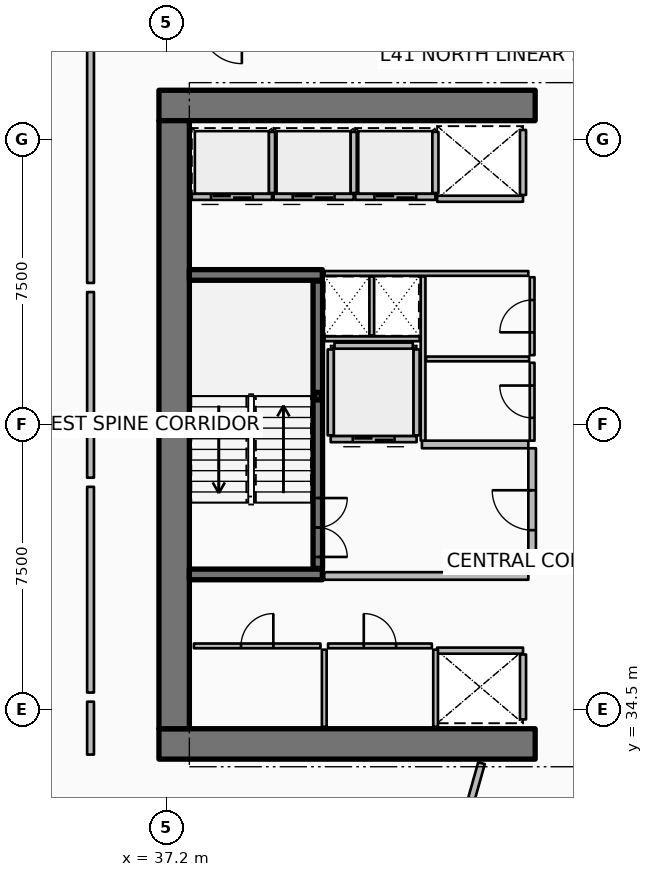
"""IFC4 building model, lengths in metres.
Left out: names, types, materials, properties, quantities, classifications, styles, units other than length and angle.
Written with IfcOpenShell. Run it as: python <this file> out.ifc"""

import sys

from ifc_helpers import new_model, si_unit, direction, frame, frame_2d, origin, origin_2d, place, context, subcontext, project, spatial, rectangle, hollow_rectangle, extrude, element, fill, save


model = new_model("IFC4")
c1 = context("Model", 3, precision=1e-05, world=origin(), true_north=direction((0.0, 1.0)))
c2 = subcontext(c1, "Body", "Model", "MODEL_VIEW")
j1 = project(units=[si_unit("LENGTHUNIT", "METRE"), si_unit("PLANEANGLEUNIT", "RADIAN")], contexts=[c1])
p1 = place(None, origin())
s1 = spatial("IfcSite", under=j1, at=p1, CompositionType="ELEMENT")
p2 = place(p1, origin())
s2 = spatial("IfcBuilding", under=s1, at=p2, CompositionType="ELEMENT")
p3 = place(p2, frame((0.0, 0.0, 165.3)))
s3 = spatial("IfcBuildingStorey", under=s2, at=p3, CompositionType="ELEMENT", Elevation=165.3)
for number, where, z_axis, x_axis in (
    (1, (37.0, 33.6, 0.0), (0.0, 0.0, 1.0), (1.0, 0.0, 0.0)),
    (2, (37.0, 50.4, 0.0), (0.0, 0.0, 1.0), (1.0, 0.0, 0.0)),
):
    element("IfcWall", number, at=place(p3, frame(where, z_axis=z_axis, x_axis=x_axis)), inside=s3, PredefinedType="SHEAR", context=c2, shape_type="SweptSolid", body=[
        extrude(rectangle(XDim=9.9, YDim=0.8, at=frame_2d((4.95, 0.0))), origin(), (0.0, 0.0, 1.0), 3.75),
    ])
p4 = place(p3, frame((37.4, 34.0, 0.0), z_axis=(0.0, 0.0, 1.0), x_axis=(0.0, 1.0, 0.0)))
e3 = element("IfcWall", 3, at=p4, inside=s3, PredefinedType="SHEAR", context=c2, shape_type="SweptSolid", body=[
    extrude(rectangle(XDim=16.0, YDim=0.8, at=frame_2d((8.0, 0.0))), origin(), (0.0, 0.0, 1.0), 3.75),
])
for number, where, z_axis, x_axis in (
    (4, (37.8, 38.06, 0.0), (0.0, 0.0, 1.0), (1.0, 0.0, 0.0)),
    (5, (37.8, 45.94, 0.0), (0.0, 0.0, 1.0), (1.0, 0.0, 0.0)),
):
    element("IfcWall", number, at=place(p3, frame(where, z_axis=z_axis, x_axis=x_axis)), inside=s3, PredefinedType="SHEAR", context=c2, shape_type="SweptSolid", body=[
        extrude(rectangle(XDim=3.5, YDim=0.28, at=frame_2d((1.75, 0.0))), origin(), (0.0, 0.0, 1.0), 3.75),
    ])
p5 = place(p3, frame((41.18, 42.75, 0.0), z_axis=(0.0, 0.0, 1.0), x_axis=(1.0, 0.0, 0.0)))
e6 = element("IfcColumn", 6, at=p5, inside=s3, PredefinedType="COLUMN", context=c2, shape_type="SweptSolid", body=[
    extrude(hollow_rectangle(XDim=0.2, YDim=0.2, WallThickness=0.01, InnerFilletRadius=0.01, OuterFilletRadius=0.02, at=origin_2d()), origin(), (0.0, 0.0, 1.0), 1.67),
])
p6 = place(p3, frame((41.18, 38.22, 0.0), z_axis=(0.0, 0.0, 1.0), x_axis=(0.0, 1.0, 0.0)))
e7 = element("IfcWall", 7, at=p6, inside=s3, PredefinedType="SOLIDWALL", context=c2, shape_type="SweptSolid", body=[
    extrude(rectangle(XDim=7.56, YDim=0.25, at=frame_2d((3.78, 0.0))), origin(), (0.0, 0.0, 1.0), 3.5),
])
p7 = place(p6, frame((0.3, 0.0, 0.0)))
e8 = element("IfcOpeningElement", 8, at=p7, cuts=e7, PredefinedType="OPENING", context=c2, shape_type="SweptSolid", body=[
    extrude(rectangle(XDim=1.55, YDim=2.15, at=frame_2d((0.775, 1.075))), frame((0.0, 0.135, 0.0), z_axis=(0.0, -1.0, 0.0), x_axis=(1.0, 0.0, 0.0)), (0.0, 0.0, 1.0), 0.27),
])
p8 = place(p3, frame((39.975, 47.995, 0.0), z_axis=(0.0, 0.0, 1.0), x_axis=(-1.0, 0.0, 0.0)))
e9 = element("IfcWall", 9, at=p8, inside=s3, PredefinedType="PARTITIONING", context=c2, shape_type="SweptSolid", body=[
    extrude(rectangle(XDim=2.11, YDim=0.16, at=frame_2d((1.055, 0.0))), origin(), (0.0, 0.0, 1.0), 3.5),
])
p9 = place(p8, frame((0.505, 0.0, 0.0)))
e10 = element("IfcOpeningElement", 10, at=p9, cuts=e9, PredefinedType="OPENING", context=c2, shape_type="SweptSolid", body=[
    extrude(rectangle(XDim=1.1, YDim=2.1, at=frame_2d((0.55, 1.05))), frame((0.0, 0.09, 0.0), z_axis=(0.0, -1.0, 0.0), x_axis=(1.0, 0.0, 0.0)), (0.0, 0.0, 1.0), 0.18),
])
p10 = place(p3, frame((39.975, 48.095, 0.0), z_axis=(0.0, 0.0, 1.0), x_axis=(0.0, 1.0, 0.0)))
e11 = element("IfcWall", 11, at=p10, inside=s3, PredefinedType="PARTITIONING", context=c2, shape_type="SweptSolid", body=[
    extrude(rectangle(XDim=1.61, YDim=0.16, at=frame_2d((0.805, 0.0))), origin(), (0.0, 0.0, 1.0), 3.5),
])
p11 = place(p3, frame((42.125, 47.995, 0.0), z_axis=(0.0, 0.0, 1.0), x_axis=(-1.0, 0.0, 0.0)))
e12 = element("IfcWall", 12, at=p11, inside=s3, PredefinedType="PARTITIONING", context=c2, shape_type="SweptSolid", body=[
    extrude(rectangle(XDim=2.11, YDim=0.16, at=frame_2d((1.055, 0.0))), origin(), (0.0, 0.0, 1.0), 3.5),
])
p12 = place(p11, frame((0.505, 0.0, 0.0)))
e13 = element("IfcOpeningElement", 13, at=p12, cuts=e12, PredefinedType="OPENING", context=c2, shape_type="SweptSolid", body=[
    extrude(rectangle(XDim=1.1, YDim=2.1, at=frame_2d((0.55, 1.05))), frame((0.0, 0.09, 0.0), z_axis=(0.0, -1.0, 0.0), x_axis=(1.0, 0.0, 0.0)), (0.0, 0.0, 1.0), 0.18),
])
p13 = place(p3, frame((42.125, 48.095, 0.0), z_axis=(0.0, 0.0, 1.0), x_axis=(0.0, 1.0, 0.0)))
e14 = element("IfcWall", 14, at=p13, inside=s3, PredefinedType="PARTITIONING", context=c2, shape_type="SweptSolid", body=[
    extrude(rectangle(XDim=1.61, YDim=0.16, at=frame_2d((0.805, 0.0))), origin(), (0.0, 0.0, 1.0), 3.5),
])
p14 = place(p3, frame((44.275, 47.995, 0.0), z_axis=(0.0, 0.0, 1.0), x_axis=(-1.0, 0.0, 0.0)))
e15 = element("IfcWall", 15, at=p14, inside=s3, PredefinedType="PARTITIONING", context=c2, shape_type="SweptSolid", body=[
    extrude(rectangle(XDim=2.11, YDim=0.16, at=frame_2d((1.055, 0.0))), origin(), (0.0, 0.0, 1.0), 3.5),
])
p15 = place(p14, frame((0.505, 0.0, 0.0)))
e16 = element("IfcOpeningElement", 16, at=p15, cuts=e15, PredefinedType="OPENING", context=c2, shape_type="SweptSolid", body=[
    extrude(rectangle(XDim=1.1, YDim=2.1, at=frame_2d((0.55, 1.05))), frame((0.0, 0.09, 0.0), z_axis=(0.0, -1.0, 0.0), x_axis=(1.0, 0.0, 0.0)), (0.0, 0.0, 1.0), 0.18),
])
p16 = place(p3, frame((44.275, 48.095, 0.0), z_axis=(0.0, 0.0, 1.0), x_axis=(0.0, 1.0, 0.0)))
e17 = element("IfcWall", 17, at=p16, inside=s3, PredefinedType="PARTITIONING", context=c2, shape_type="SweptSolid", body=[
    extrude(rectangle(XDim=1.61, YDim=0.16, at=frame_2d((0.805, 0.0))), origin(), (0.0, 0.0, 1.0), 3.5),
])
p17 = place(p3, frame((46.58, 47.945, 0.0), z_axis=(0.0, 0.0, 1.0), x_axis=(-1.0, 0.0, 0.0)))
e18 = element("IfcWall", 18, at=p17, inside=s3, PredefinedType="PARTITIONING", context=c2, shape_type="SweptSolid", body=[
    extrude(rectangle(XDim=2.26, YDim=0.16, at=frame_2d((1.13, 0.0))), origin(), (0.0, 0.0, 1.0), 3.5),
])
p18 = place(p3, frame((46.58, 48.045, 0.0), z_axis=(0.0, 0.0, 1.0), x_axis=(0.0, 1.0, 0.0)))
e19 = element("IfcWall", 19, at=p18, inside=s3, PredefinedType="PARTITIONING", context=c2, shape_type="SweptSolid", body=[
    extrude(rectangle(XDim=1.71, YDim=0.16, at=frame_2d((0.855, 0.0))), origin(), (0.0, 0.0, 1.0), 3.5),
])
p19 = place(p3, frame((44.32, 36.055, 0.0), z_axis=(0.0, 0.0, 1.0), x_axis=(1.0, 0.0, 0.0)))
e20 = element("IfcWall", 20, at=p19, inside=s3, PredefinedType="PARTITIONING", context=c2, shape_type="SweptSolid", body=[
    extrude(rectangle(XDim=2.26, YDim=0.16, at=frame_2d((1.13, 0.0))), origin(), (0.0, 0.0, 1.0), 3.5),
])
p20 = place(p3, frame((46.58, 34.245, 0.0), z_axis=(0.0, 0.0, 1.0), x_axis=(0.0, 1.0, 0.0)))
e21 = element("IfcWall", 21, at=p20, inside=s3, PredefinedType="PARTITIONING", context=c2, shape_type="SweptSolid", body=[
    extrude(rectangle(XDim=1.71, YDim=0.16, at=frame_2d((0.855, 0.0))), origin(), (0.0, 0.0, 1.0), 3.5),
])
p21 = place(p3, frame((43.78, 41.62, 0.0), z_axis=(0.0, 0.0, 1.0), x_axis=(-1.0, 0.0, 0.0)))
e22 = element("IfcWall", 22, at=p21, inside=s3, PredefinedType="PARTITIONING", context=c2, shape_type="SweptSolid", body=[
    extrude(rectangle(XDim=2.26, YDim=0.16, at=frame_2d((1.13, 0.0))), origin(), (0.0, 0.0, 1.0), 3.5),
])
p22 = place(p21, frame((0.58, 0.0, 0.0)))
e23 = element("IfcOpeningElement", 23, at=p22, cuts=e22, PredefinedType="OPENING", context=c2, shape_type="SweptSolid", body=[
    extrude(rectangle(XDim=1.1, YDim=2.1, at=frame_2d((0.55, 1.05))), frame((0.0, 0.09, 0.0), z_axis=(0.0, -1.0, 0.0), x_axis=(1.0, 0.0, 0.0)), (0.0, 0.0, 1.0), 0.18),
])
for number, where, z_axis, x_axis in (
    (24, (43.78, 41.72, 0.0), (0.0, 0.0, 1.0), (0.0, 1.0, 0.0)),
    (25, (41.52, 41.72, 0.0), (0.0, 0.0, 1.0), (0.0, 1.0, 0.0)),
):
    element("IfcWall", number, at=place(p3, frame(where, z_axis=z_axis, x_axis=x_axis)), inside=s3, PredefinedType="PARTITIONING", context=c2, shape_type="SweptSolid", body=[
        extrude(rectangle(XDim=2.26, YDim=0.16, at=frame_2d((1.13, 0.0))), origin(), (0.0, 0.0, 1.0), 3.5),
    ])
p23 = place(p3, frame((41.62, 44.08, 0.0), z_axis=(0.0, 0.0, 1.0), x_axis=(1.0, 0.0, 0.0)))
e26 = element("IfcWall", 26, at=p23, inside=s3, PredefinedType="PARTITIONING", context=c2, shape_type="SweptSolid", body=[
    extrude(rectangle(XDim=2.06, YDim=0.16, at=frame_2d((1.03, 0.0))), origin(), (0.0, 0.0, 1.0), 3.5),
])
for number, where, z_axis, x_axis in (
    (27, (44.28, 34.05, 0.0), (0.0, 0.0, 1.0), (0.0, 1.0, 0.0)),
    (28, (41.35, 34.05, 0.0), (0.0, 0.0, 1.0), (0.0, 1.0, 0.0)),
):
    element("IfcWall", number, at=place(p3, frame(where, z_axis=z_axis, x_axis=x_axis)), inside=s3, PredefinedType="PARTITIONING", context=c2, shape_type="SweptSolid", body=[
        extrude(rectangle(XDim=2.03, YDim=0.125, at=frame_2d((1.015, 0.0))), origin(), (0.0, 0.0, 1.0), 2.94),
    ])
p24 = place(p3, frame((37.92, 36.18, 0.0), z_axis=(0.0, 0.0, 1.0), x_axis=(1.0, 0.0, 0.0)))
e29 = element("IfcWall", 29, at=p24, inside=s3, PredefinedType="PARTITIONING", context=c2, shape_type="SweptSolid", body=[
    extrude(rectangle(XDim=3.33, YDim=0.125, at=frame_2d((1.665, 0.0))), origin(), (0.0, 0.0, 1.0), 2.94),
])
p25 = place(p24, frame((1.24, 0.0, 0.0)))
e30 = element("IfcOpeningElement", 30, at=p25, cuts=e29, PredefinedType="OPENING", context=c2, shape_type="SweptSolid", body=[
    extrude(rectangle(XDim=0.85, YDim=2.06, at=frame_2d((0.425, 1.03))), frame((0.0, 0.073, 0.0), z_axis=(0.0, -1.0, 0.0), x_axis=(1.0, 0.0, 0.0)), (0.0, 0.0, 1.0), 0.145),
])
p26 = place(p3, frame((41.45, 36.18, 0.0), z_axis=(0.0, 0.0, 1.0), x_axis=(1.0, 0.0, 0.0)))
e31 = element("IfcWall", 31, at=p26, inside=s3, PredefinedType="PARTITIONING", context=c2, shape_type="SweptSolid", body=[
    extrude(rectangle(XDim=2.73, YDim=0.125, at=frame_2d((1.365, 0.0))), origin(), (0.0, 0.0, 1.0), 2.94),
])
p27 = place(p26, frame((0.94, 0.0, 0.0)))
e32 = element("IfcOpeningElement", 32, at=p27, cuts=e31, PredefinedType="OPENING", context=c2, shape_type="SweptSolid", body=[
    extrude(rectangle(XDim=0.85, YDim=2.06, at=frame_2d((0.425, 1.03))), frame((0.0, 0.073, 0.0), z_axis=(0.0, -1.0, 0.0), x_axis=(1.0, 0.0, 0.0)), (0.0, 0.0, 1.0), 0.145),
])
p28 = place(p3, frame((41.35, 38.02, 0.0), z_axis=(0.0, 0.0, 1.0), x_axis=(1.0, 0.0, 0.0)))
e33 = element("IfcWall", 33, at=p28, inside=s3, PredefinedType="PARTITIONING", context=c2, shape_type="SweptSolid", body=[
    extrude(rectangle(XDim=5.37, YDim=0.2, at=frame_2d((2.685, 0.0))), origin(), (0.0, 0.0, 1.0), 3.5),
])
p29 = place(p3, frame((43.92, 41.48, 0.0), z_axis=(0.0, 0.0, 1.0), x_axis=(1.0, 0.0, 0.0)))
e34 = element("IfcWall", 34, at=p29, inside=s3, PredefinedType="PARTITIONING", context=c2, shape_type="SweptSolid", body=[
    extrude(rectangle(XDim=2.8, YDim=0.2, at=frame_2d((1.4, 0.0))), origin(), (0.0, 0.0, 1.0), 3.5),
])
p30 = place(p3, frame((46.82, 38.12, 0.0), z_axis=(0.0, 0.0, 1.0), x_axis=(0.0, 1.0, 0.0)))
e35 = element("IfcWall", 35, at=p30, inside=s3, PredefinedType="PARTITIONING", context=c2, shape_type="SweptSolid", body=[
    extrude(rectangle(XDim=3.26, YDim=0.2, at=frame_2d((1.63, 0.0))), origin(), (0.0, 0.0, 1.0), 3.5),
])
p31 = place(p30, frame((1.105, 0.0, 0.0)))
e36 = element("IfcOpeningElement", 36, at=p31, cuts=e35, PredefinedType="OPENING", context=c2, shape_type="SweptSolid", body=[
    extrude(rectangle(XDim=1.05, YDim=2.1, at=frame_2d((0.525, 1.05))), frame((0.0, 0.11, 0.0), z_axis=(0.0, -1.0, 0.0), x_axis=(1.0, 0.0, 0.0)), (0.0, 0.0, 1.0), 0.22),
])
p32 = place(p3, frame((41.36, 45.98, 0.0), z_axis=(0.0, 0.0, 1.0), x_axis=(1.0, 0.0, 0.0)))
e37 = element("IfcWall", 37, at=p32, inside=s3, PredefinedType="PARTITIONING", context=c2, shape_type="SweptSolid", body=[
    extrude(rectangle(XDim=5.36, YDim=0.125, at=frame_2d((2.68, 0.0))), origin(), (0.0, 0.0, 1.0), 2.94),
])
p33 = place(p3, frame((41.36, 44.26, 0.0), z_axis=(0.0, 0.0, 1.0), x_axis=(1.0, 0.0, 0.0)))
e38 = element("IfcWall", 38, at=p33, inside=s3, PredefinedType="PARTITIONING", context=c2, shape_type="SweptSolid", body=[
    extrude(rectangle(XDim=2.5, YDim=0.125, at=frame_2d((1.25, 0.0))), origin(), (0.0, 0.0, 1.0), 2.94),
])
p34 = place(p3, frame((42.6, 44.35, 0.0), z_axis=(0.0, 0.0, 1.0), x_axis=(0.0, 1.0, 0.0)))
e39 = element("IfcWall", 39, at=p34, inside=s3, PredefinedType="PARTITIONING", context=c2, shape_type="SweptSolid", body=[
    extrude(rectangle(XDim=1.55, YDim=0.125, at=frame_2d((0.775, 0.0))), origin(), (0.0, 0.0, 1.0), 2.94),
])
p35 = place(p3, frame((43.95, 41.58, 0.0), z_axis=(0.0, 0.0, 1.0), x_axis=(0.0, 1.0, 0.0)))
e40 = element("IfcWall", 40, at=p35, inside=s3, PredefinedType="PARTITIONING", context=c2, shape_type="SweptSolid", body=[
    extrude(rectangle(XDim=4.32, YDim=0.125, at=frame_2d((2.16, 0.0))), origin(), (0.0, 0.0, 1.0), 2.94),
])
p36 = place(p3, frame((44.03, 43.73, 0.0), z_axis=(0.0, 0.0, 1.0), x_axis=(1.0, 0.0, 0.0)))
e41 = element("IfcWall", 41, at=p36, inside=s3, PredefinedType="PARTITIONING", context=c2, shape_type="SweptSolid", body=[
    extrude(rectangle(XDim=2.71, YDim=0.125, at=frame_2d((1.355, 0.0))), origin(), (0.0, 0.0, 1.0), 2.94),
])
p37 = place(p3, frame((46.82, 41.58, 0.0), z_axis=(0.0, 0.0, 1.0), x_axis=(0.0, 1.0, 0.0)))
e42 = element("IfcWall", 42, at=p37, inside=s3, PredefinedType="PARTITIONING", context=c2, shape_type="SweptSolid", body=[
    extrude(rectangle(XDim=2.05, YDim=0.125, at=frame_2d((1.025, 0.0))), origin(), (0.0, 0.0, 1.0), 2.94),
])
p38 = place(p37, frame((0.6, 0.0, 0.0)))
e43 = element("IfcOpeningElement", 43, at=p38, cuts=e42, PredefinedType="OPENING", context=c2, shape_type="SweptSolid", body=[
    extrude(rectangle(XDim=0.85, YDim=2.06, at=frame_2d((0.425, 1.03))), frame((0.0, 0.073, 0.0), z_axis=(0.0, -1.0, 0.0), x_axis=(1.0, 0.0, 0.0)), (0.0, 0.0, 1.0), 0.145),
])
p39 = place(p3, frame((46.82, 43.83, 0.0), z_axis=(0.0, 0.0, 1.0), x_axis=(0.0, 1.0, 0.0)))
e44 = element("IfcWall", 44, at=p39, inside=s3, PredefinedType="PARTITIONING", context=c2, shape_type="SweptSolid", body=[
    extrude(rectangle(XDim=2.05, YDim=0.125, at=frame_2d((1.025, 0.0))), origin(), (0.0, 0.0, 1.0), 2.94),
])
p40 = place(p39, frame((0.6, 0.0, 0.0)))
e45 = element("IfcOpeningElement", 45, at=p40, cuts=e44, PredefinedType="OPENING", context=c2, shape_type="SweptSolid", body=[
    extrude(rectangle(XDim=0.85, YDim=2.06, at=frame_2d((0.425, 1.03))), frame((0.0, 0.073, 0.0), z_axis=(0.0, -1.0, 0.0), x_axis=(1.0, 0.0, 0.0)), (0.0, 0.0, 1.0), 0.145),
])
p41 = place(p3, frame((45.488, 33.094, 0.0), z_axis=(0.0, 0.0, 1.0), x_axis=(-0.271442952208, -0.962454530717, 0.0)))
e46 = element("IfcWall", 46, at=p41, inside=s3, PredefinedType="PARTITIONING", context=c2, shape_type="SweptSolid", body=[
    extrude(rectangle(XDim=14.486, YDim=0.18, at=frame_2d((7.243, 0.0))), origin(), (0.0, 0.0, 1.0), 2.94),
])
p42 = place(p3, frame((35.2, 51.971, 0.0), z_axis=(0.0, 0.0, 1.0), x_axis=(0.0, -1.0, 0.0)))
e47 = element("IfcWall", 47, at=p42, inside=s3, PredefinedType="PARTITIONING", context=c2, shape_type="SweptSolid", body=[
    extrude(rectangle(XDim=6.241, YDim=0.18, at=frame_2d((3.12, 0.0))), origin(), (0.0, 0.0, 1.0), 2.94),
])
p43 = place(p3, frame((35.2, 45.49, 0.0), z_axis=(0.0, 0.0, 1.0), x_axis=(0.0, -1.0, 0.0)))
e48 = element("IfcWall", 48, at=p43, inside=s3, PredefinedType="PARTITIONING", context=c2, shape_type="SweptSolid", body=[
    extrude(rectangle(XDim=4.885, YDim=0.18, at=frame_2d((2.442, 0.0))), origin(), (0.0, 0.0, 1.0), 2.94),
])
p44 = place(p3, frame((35.2, 40.365, 0.0), z_axis=(0.0, 0.0, 1.0), x_axis=(0.0, -1.0, 0.0)))
e49 = element("IfcWall", 49, at=p44, inside=s3, PredefinedType="PARTITIONING", context=c2, shape_type="SweptSolid", body=[
    extrude(rectangle(XDim=5.413, YDim=0.18, at=frame_2d((2.707, 0.0))), origin(), (0.0, 0.0, 1.0), 2.94),
])
p45 = place(p3, frame((35.2, 34.712, 0.0), z_axis=(0.0, 0.0, 1.0), x_axis=(0.0, -1.0, 0.0)))
e50 = element("IfcWall", 50, at=p45, inside=s3, PredefinedType="PARTITIONING", context=c2, shape_type="SweptSolid", body=[
    extrude(rectangle(XDim=1.392, YDim=0.18, at=frame_2d((0.696, 0.0))), origin(), (0.0, 0.0, 1.0), 2.94),
])
p46 = place(p3, frame((31.983, 32.907, 0.0), z_axis=(0.0, 0.0, 1.0), x_axis=(0.649447060425, -0.76040680935, 0.0)))
e51 = element("IfcWall", 51, at=p46, inside=s3, PredefinedType="PARTITIONING", context=c2, shape_type="SweptSolid", body=[
    extrude(rectangle(XDim=6.975, YDim=0.125, at=frame_2d((3.487, 0.0))), origin(), (0.0, 0.0, 1.0), 2.94),
])
p47 = place(p46, frame((3.037, 0.0, 0.0)))
e52 = element("IfcOpeningElement", 52, at=p47, cuts=e51, PredefinedType="OPENING", context=c2, shape_type="SweptSolid", body=[
    extrude(rectangle(XDim=0.9, YDim=2.08, at=frame_2d((0.45, 1.04))), frame((0.0, 0.073, 0.0), z_axis=(0.0, -1.0, 0.0), x_axis=(1.0, 0.0, 0.0)), (0.0, 0.0, 1.0), 0.145),
])
p48 = place(p7, origin())
e53 = element("IfcDoor", 53, at=p48, inside=s3, OperationType="DOUBLE_DOOR_SINGLE_SWING", PredefinedType="DOOR", context=c2, shape_type="SweptSolid", body=[
    extrude(rectangle(XDim=1.55, YDim=2.15, at=frame_2d((0.775, 1.075))), frame((0.0, 0.025, 0.0), z_axis=(0.0, -1.0, 0.0), x_axis=(1.0, 0.0, 0.0)), (0.0, 0.0, 1.0), 0.05),
])
fill(e8, e53)
p49 = place(p9, origin())
e54 = element("IfcDoor", 54, at=p49, inside=s3, OperationType="DOUBLE_DOOR_SLIDING", PredefinedType="DOOR", context=c2, shape_type="SweptSolid", body=[
    extrude(rectangle(XDim=1.1, YDim=2.1, at=frame_2d((0.55, 1.05))), frame((0.0, 0.025, 0.0), z_axis=(0.0, -1.0, 0.0), x_axis=(1.0, 0.0, 0.0)), (0.0, 0.0, 1.0), 0.05),
])
fill(e10, e54)
p50 = place(p12, origin())
e55 = element("IfcDoor", 55, at=p50, inside=s3, OperationType="DOUBLE_DOOR_SLIDING", PredefinedType="DOOR", context=c2, shape_type="SweptSolid", body=[
    extrude(rectangle(XDim=1.1, YDim=2.1, at=frame_2d((0.55, 1.05))), frame((0.0, 0.025, 0.0), z_axis=(0.0, -1.0, 0.0), x_axis=(1.0, 0.0, 0.0)), (0.0, 0.0, 1.0), 0.05),
])
fill(e13, e55)
p51 = place(p15, origin())
e56 = element("IfcDoor", 56, at=p51, inside=s3, OperationType="DOUBLE_DOOR_SLIDING", PredefinedType="DOOR", context=c2, shape_type="SweptSolid", body=[
    extrude(rectangle(XDim=1.1, YDim=2.1, at=frame_2d((0.55, 1.05))), frame((0.0, 0.025, 0.0), z_axis=(0.0, -1.0, 0.0), x_axis=(1.0, 0.0, 0.0)), (0.0, 0.0, 1.0), 0.05),
])
fill(e16, e56)
p52 = place(p22, origin())
e57 = element("IfcDoor", 57, at=p52, inside=s3, OperationType="DOUBLE_DOOR_SLIDING", PredefinedType="DOOR", context=c2, shape_type="SweptSolid", body=[
    extrude(rectangle(XDim=1.1, YDim=2.1, at=frame_2d((0.55, 1.05))), frame((0.0, 0.025, 0.0), z_axis=(0.0, -1.0, 0.0), x_axis=(1.0, 0.0, 0.0)), (0.0, 0.0, 1.0), 0.05),
])
fill(e23, e57)
p53 = place(p25, origin())
e58 = element("IfcDoor", 58, at=p53, inside=s3, OperationType="SINGLE_SWING_RIGHT", PredefinedType="DOOR", context=c2, shape_type="SweptSolid", body=[
    extrude(rectangle(XDim=0.85, YDim=2.06, at=frame_2d((0.425, 1.03))), frame((0.0, 0.025, 0.0), z_axis=(0.0, -1.0, 0.0), x_axis=(1.0, 0.0, 0.0)), (0.0, 0.0, 1.0), 0.05),
])
fill(e30, e58)
p54 = place(p27, origin())
e59 = element("IfcDoor", 59, at=p54, inside=s3, OperationType="SINGLE_SWING_LEFT", PredefinedType="DOOR", context=c2, shape_type="SweptSolid", body=[
    extrude(rectangle(XDim=0.85, YDim=2.06, at=frame_2d((0.425, 1.03))), frame((0.0, 0.025, 0.0), z_axis=(0.0, -1.0, 0.0), x_axis=(1.0, 0.0, 0.0)), (0.0, 0.0, 1.0), 0.05),
])
fill(e32, e59)
p55 = place(p31, origin())
e60 = element("IfcDoor", 60, at=p55, inside=s3, OperationType="SINGLE_SWING_RIGHT", PredefinedType="DOOR", context=c2, shape_type="SweptSolid", body=[
    extrude(rectangle(XDim=1.05, YDim=2.1, at=frame_2d((0.525, 1.05))), frame((0.0, 0.025, 0.0), z_axis=(0.0, -1.0, 0.0), x_axis=(1.0, 0.0, 0.0)), (0.0, 0.0, 1.0), 0.05),
])
fill(e36, e60)
p56 = place(p38, origin())
e61 = element("IfcDoor", 61, at=p56, inside=s3, OperationType="SINGLE_SWING_RIGHT", PredefinedType="DOOR", context=c2, shape_type="SweptSolid", body=[
    extrude(rectangle(XDim=0.85, YDim=2.06, at=frame_2d((0.425, 1.03))), frame((0.0, 0.025, 0.0), z_axis=(0.0, -1.0, 0.0), x_axis=(1.0, 0.0, 0.0)), (0.0, 0.0, 1.0), 0.05),
])
fill(e43, e61)
p57 = place(p40, origin())
e62 = element("IfcDoor", 62, at=p57, inside=s3, OperationType="SINGLE_SWING_LEFT", PredefinedType="DOOR", context=c2, shape_type="SweptSolid", body=[
    extrude(rectangle(XDim=0.85, YDim=2.06, at=frame_2d((0.425, 1.03))), frame((0.0, 0.025, 0.0), z_axis=(0.0, -1.0, 0.0), x_axis=(1.0, 0.0, 0.0)), (0.0, 0.0, 1.0), 0.05),
])
fill(e45, e62)
save(model, sys.argv[1])
